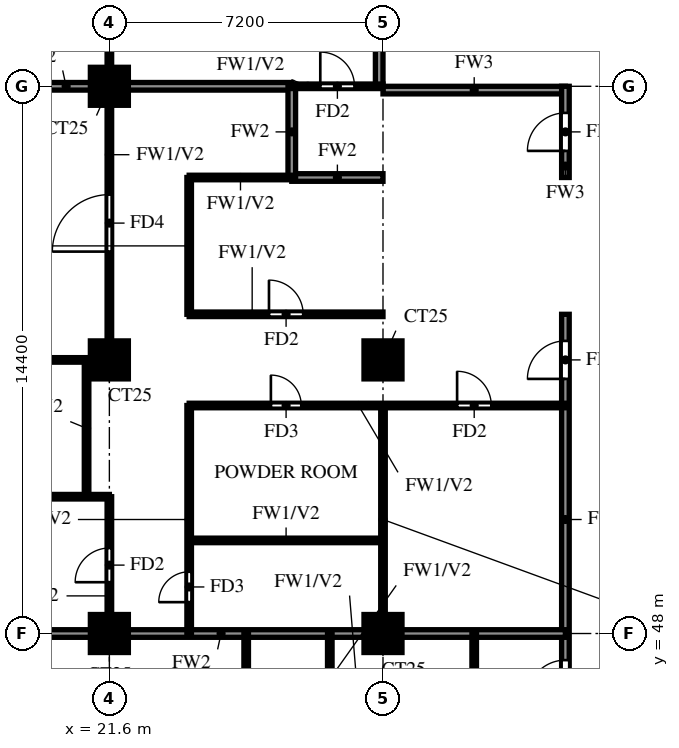
"""IFC4 building model, lengths in metres.
Left out: names, types, materials, properties, quantities, classifications, styles, units other than length and angle.
Written with IfcOpenShell. Run it as: python <this file> out.ifc"""

import sys

from ifc_helpers import new_model, si_unit, direction, frame, frame_2d, origin, origin_2d, place, context, subcontext, project, spatial, rectangle, extrude, source, transform, mapped, element, fill, save


model = new_model("IFC4")
c1 = context("Model", 3, precision=1e-05, world=origin(), true_north=direction((0.0, 1.0)))
c2 = subcontext(c1, "Body", "Model", "MODEL_VIEW")
j1 = project(units=[si_unit("LENGTHUNIT", "METRE"), si_unit("PLANEANGLEUNIT", "RADIAN")], contexts=[c1])
p1 = place(None, origin())
s1 = spatial("IfcSite", under=j1, at=p1, CompositionType="ELEMENT")
p2 = place(p1, origin())
s2 = spatial("IfcBuilding", under=s1, at=p2, CompositionType="ELEMENT")
p3 = place(p2, frame((0.0, 0.0, 167.5)))
s3 = spatial("IfcBuildingStorey", under=s2, at=p3, CompositionType="ELEMENT", Elevation=167.5)
m1 = source(origin(), c2, "Body", "SweptSolid", [
    extrude(rectangle(XDim=1.0, YDim=1.0, at=origin_2d()), origin(), (0.0, 0.0, 1.0), 3.2),
])
for number, where, z_axis, x_axis in (
    (1, (21.6, 48.0, 0.0), (0.0, 0.0, 1.0), (1.0, 0.0, 0.0)),
    (2, (28.8, 48.0, 0.0), (0.0, 0.0, 1.0), (1.0, 0.0, 0.0)),
    (3, (21.6, 55.2, 0.0), (0.0, 0.0, 1.0), (1.0, 0.0, 0.0)),
    (4, (28.8, 55.2, 0.0), (0.0, 0.0, 1.0), (1.0, 0.0, 0.0)),
    (5, (21.6, 62.4, 0.0), (0.0, 0.0, 1.0), (1.0, 0.0, 0.0)),
):
    element("IfcColumn", number, at=place(p3, frame(where, z_axis=z_axis, x_axis=x_axis)), inside=s3, PredefinedType="COLUMN", context=c2, shape_type="MappedRepresentation", body=[
        mapped(m1, transform((0.0, 0.0, 0.0))),
    ])
p4 = place(p3, frame((28.8, 62.3, 0.0), z_axis=(0.0, 0.0, 1.0), x_axis=(1.0, 0.0, 0.0)))
e6 = element("IfcWall", 6, at=p4, inside=s3, PredefinedType="SOLIDWALL", context=c2, shape_type="SweptSolid", body=[
    extrude(rectangle(XDim=4.8, YDim=0.2, at=frame_2d((2.4, 0.0))), origin(), (0.0, 0.0, 1.0), 3.2),
])
p5 = place(p3, frame((28.7, 62.4, 0.0), z_axis=(0.0, 0.0, 1.0), x_axis=(0.0, 1.0, 0.0)))
e7 = element("IfcWall", 7, at=p5, inside=s3, PredefinedType="SOLIDWALL", context=c2, shape_type="SweptSolid", body=[
    extrude(rectangle(XDim=15.6, YDim=0.2, at=frame_2d((7.8, 0.0))), origin(), (0.0, 0.0, 1.0), 3.2),
])
p6 = place(p3, frame((33.6, 45.6, 0.0), z_axis=(0.0, 0.0, 1.0), x_axis=(0.0, 1.0, 0.0)))
e8 = element("IfcWall", 8, at=p6, inside=s3, PredefinedType="SOLIDWALL", context=c2, shape_type="SweptSolid", body=[
    extrude(rectangle(XDim=10.8, YDim=0.2, at=frame_2d((5.4, 0.0))), origin(), (0.0, 0.0, 1.0), 3.2),
])
p7 = place(p6, frame((0.7, 0.0, 0.0)))
e9 = element("IfcOpeningElement", 9, at=p7, cuts=e8, PredefinedType="OPENING", context=c2, shape_type="SweptSolid", body=[
    extrude(rectangle(XDim=1.0, YDim=2.1, at=frame_2d((0.5, 1.05))), frame((0.0, 0.11, 0.0), z_axis=(0.0, -1.0, 0.0), x_axis=(1.0, 0.0, 0.0)), (0.0, 0.0, 1.0), 0.22),
])
p8 = place(p6, frame((9.1, 0.0, 0.0)))
e10 = element("IfcOpeningElement", 10, at=p8, cuts=e8, PredefinedType="OPENING", context=c2, shape_type="SweptSolid", body=[
    extrude(rectangle(XDim=1.0, YDim=2.1, at=frame_2d((0.5, 1.05))), frame((0.0, 0.11, 0.0), z_axis=(0.0, -1.0, 0.0), x_axis=(1.0, 0.0, 0.0)), (0.0, 0.0, 1.0), 0.22),
])
p9 = place(p3, frame((33.6, 60.0, 0.0), z_axis=(0.0, 0.0, 1.0), x_axis=(0.0, 1.0, 0.0)))
e11 = element("IfcWall", 11, at=p9, inside=s3, PredefinedType="SOLIDWALL", context=c2, shape_type="SweptSolid", body=[
    extrude(rectangle(XDim=2.4, YDim=0.2, at=frame_2d((1.2, 0.0))), origin(), (0.0, 0.0, 1.0), 3.2),
])
p10 = place(p9, frame((0.7, 0.0, 0.0)))
e12 = element("IfcOpeningElement", 12, at=p10, cuts=e11, PredefinedType="OPENING", context=c2, shape_type="SweptSolid", body=[
    extrude(rectangle(XDim=1.0, YDim=2.1, at=frame_2d((0.5, 1.05))), frame((0.0, 0.11, 0.0), z_axis=(0.0, -1.0, 0.0), x_axis=(1.0, 0.0, 0.0)), (0.0, 0.0, 1.0), 0.22),
])
p11 = place(p3, frame((14.525, 48.0, 0.0), z_axis=(0.0, 0.0, 1.0), x_axis=(1.0, 0.0, 0.0)))
e13 = element("IfcWall", 13, at=p11, inside=s3, PredefinedType="SOLIDWALL", context=c2, shape_type="SweptSolid", body=[
    extrude(rectangle(XDim=19.075, YDim=0.2, at=frame_2d((9.538, 0.0))), origin(), (0.0, 0.0, 1.0), 3.2),
])
p12 = place(p3, frame((26.4, 60.0, 0.0), z_axis=(0.0, 0.0, 1.0), x_axis=(1.0, 0.0, 0.0)))
e14 = element("IfcWall", 14, at=p12, inside=s3, PredefinedType="SOLIDWALL", context=c2, shape_type="SweptSolid", body=[
    extrude(rectangle(XDim=2.4, YDim=0.2, at=frame_2d((1.2, 0.0))), origin(), (0.0, 0.0, 1.0), 3.2),
])
p13 = place(p3, frame((14.525, 62.4, 0.0), z_axis=(0.0, 0.0, 1.0), x_axis=(1.0, 0.0, 0.0)))
e15 = element("IfcWall", 15, at=p13, inside=s3, PredefinedType="SOLIDWALL", context=c2, shape_type="SweptSolid", body=[
    extrude(rectangle(XDim=11.875, YDim=0.2, at=frame_2d((5.938, 0.0))), origin(), (0.0, 0.0, 1.0), 3.2),
])
p14 = place(p3, frame((26.4, 60.0, 0.0), z_axis=(0.0, 0.0, 1.0), x_axis=(0.0, 1.0, 0.0)))
e16 = element("IfcWall", 16, at=p14, inside=s3, PredefinedType="SOLIDWALL", context=c2, shape_type="SweptSolid", body=[
    extrude(rectangle(XDim=2.4, YDim=0.2, at=frame_2d((1.2, 0.0))), origin(), (0.0, 0.0, 1.0), 3.2),
])
p15 = place(p3, frame((23.7, 50.45, 0.0), z_axis=(0.0, 0.0, 1.0), x_axis=(1.0, 0.0, 0.0)))
e17 = element("IfcWall", 17, at=p15, inside=s3, PredefinedType="PARTITIONING", context=c2, shape_type="SweptSolid", body=[
    extrude(rectangle(XDim=5.1, YDim=0.12, at=frame_2d((2.55, 0.0))), origin(), (0.0, 0.0, 1.0), 3.2),
])
p16 = place(p3, frame((14.525, 51.6, 0.0), z_axis=(0.0, 0.0, 1.0), x_axis=(1.0, 0.0, 0.0)))
e18 = element("IfcWall", 18, at=p16, inside=s3, PredefinedType="PARTITIONING", context=c2, shape_type="SweptSolid", body=[
    extrude(rectangle(XDim=7.075, YDim=0.12, at=frame_2d((3.538, 0.0))), origin(), (0.0, 0.0, 1.0), 2.3),
])
p17 = place(p16, frame((2.837, 0.0, 0.0)))
e19 = element("IfcOpeningElement", 19, at=p17, cuts=e18, PredefinedType="OPENING", context=c2, shape_type="SweptSolid", body=[
    extrude(rectangle(XDim=0.8, YDim=2.1, at=frame_2d((0.4, 1.05))), frame((0.0, 0.07, 0.0), z_axis=(0.0, -1.0, 0.0), x_axis=(1.0, 0.0, 0.0)), (0.0, 0.0, 1.0), 0.14),
])
p18 = place(p3, frame((23.7, 54.0, 0.0), z_axis=(0.0, 0.0, 1.0), x_axis=(1.0, 0.0, 0.0)))
e20 = element("IfcWall", 20, at=p18, inside=s3, PredefinedType="PARTITIONING", context=c2, shape_type="SweptSolid", body=[
    extrude(rectangle(XDim=9.9, YDim=0.12, at=frame_2d((4.95, 0.0))), origin(), (0.0, 0.0, 1.0), 3.2),
])
p19 = place(p18, frame((2.15, 0.0, 0.0)))
e21 = element("IfcOpeningElement", 21, at=p19, cuts=e20, PredefinedType="OPENING", context=c2, shape_type="SweptSolid", body=[
    extrude(rectangle(XDim=0.8, YDim=2.1, at=frame_2d((0.4, 1.05))), frame((0.0, 0.07, 0.0), z_axis=(0.0, -1.0, 0.0), x_axis=(1.0, 0.0, 0.0)), (0.0, 0.0, 1.0), 0.14),
])
p20 = place(p18, frame((7.05, 0.0, 0.0)))
e22 = element("IfcOpeningElement", 22, at=p20, cuts=e20, PredefinedType="OPENING", context=c2, shape_type="SweptSolid", body=[
    extrude(rectangle(XDim=0.9, YDim=2.1, at=frame_2d((0.45, 1.05))), frame((0.0, 0.07, 0.0), z_axis=(0.0, -1.0, 0.0), x_axis=(1.0, 0.0, 0.0)), (0.0, 0.0, 1.0), 0.14),
])
p21 = place(p3, frame((14.525, 55.2, 0.0), z_axis=(0.0, 0.0, 1.0), x_axis=(1.0, 0.0, 0.0)))
e23 = element("IfcWall", 23, at=p21, inside=s3, PredefinedType="PARTITIONING", context=c2, shape_type="SweptSolid", body=[
    extrude(rectangle(XDim=7.075, YDim=0.12, at=frame_2d((3.538, 0.0))), origin(), (0.0, 0.0, 1.0), 3.2),
])
p22 = place(p3, frame((23.7, 56.4, 0.0), z_axis=(0.0, 0.0, 1.0), x_axis=(1.0, 0.0, 0.0)))
e24 = element("IfcWall", 24, at=p22, inside=s3, PredefinedType="PARTITIONING", context=c2, shape_type="SweptSolid", body=[
    extrude(rectangle(XDim=5.1, YDim=0.12, at=frame_2d((2.55, 0.0))), origin(), (0.0, 0.0, 1.0), 3.2),
])
p23 = place(p22, frame((2.1, 0.0, 0.0)))
e25 = element("IfcOpeningElement", 25, at=p23, cuts=e24, PredefinedType="OPENING", context=c2, shape_type="SweptSolid", body=[
    extrude(rectangle(XDim=0.9, YDim=2.1, at=frame_2d((0.45, 1.05))), frame((0.0, 0.07, 0.0), z_axis=(0.0, -1.0, 0.0), x_axis=(1.0, 0.0, 0.0)), (0.0, 0.0, 1.0), 0.14),
])
p24 = place(p3, frame((23.7, 60.0, 0.0), z_axis=(0.0, 0.0, 1.0), x_axis=(1.0, 0.0, 0.0)))
e26 = element("IfcWall", 26, at=p24, inside=s3, PredefinedType="PARTITIONING", context=c2, shape_type="SweptSolid", body=[
    extrude(rectangle(XDim=2.7, YDim=0.12, at=frame_2d((1.35, 0.0))), origin(), (0.0, 0.0, 1.0), 3.2),
])
p25 = place(p3, frame((26.4, 62.4, 0.0), z_axis=(0.0, 0.0, 1.0), x_axis=(1.0, 0.0, 0.0)))
e27 = element("IfcWall", 27, at=p25, inside=s3, PredefinedType="PARTITIONING", context=c2, shape_type="SweptSolid", body=[
    extrude(rectangle(XDim=2.4, YDim=0.12, at=frame_2d((1.2, 0.0))), origin(), (0.0, 0.0, 1.0), 3.2),
])
p26 = place(p25, frame((0.75, 0.0, 0.0)))
e28 = element("IfcOpeningElement", 28, at=p26, cuts=e27, PredefinedType="OPENING", context=c2, shape_type="SweptSolid", body=[
    extrude(rectangle(XDim=0.9, YDim=2.1, at=frame_2d((0.45, 1.05))), frame((0.0, 0.07, 0.0), z_axis=(0.0, -1.0, 0.0), x_axis=(1.0, 0.0, 0.0)), (0.0, 0.0, 1.0), 0.14),
])
p27 = place(p3, frame((21.0, 51.6, 0.0), z_axis=(0.0, 0.0, 1.0), x_axis=(0.0, 1.0, 0.0)))
e29 = element("IfcWall", 29, at=p27, inside=s3, PredefinedType="PARTITIONING", context=c2, shape_type="SweptSolid", body=[
    extrude(rectangle(XDim=3.6, YDim=0.12, at=frame_2d((1.8, 0.0))), origin(), (0.0, 0.0, 1.0), 3.2),
])
p28 = place(p3, frame((21.6, 48.0, 0.0), z_axis=(0.0, 0.0, 1.0), x_axis=(0.0, 1.0, 0.0)))
e30 = element("IfcWall", 30, at=p28, inside=s3, PredefinedType="PARTITIONING", context=c2, shape_type="SweptSolid", body=[
    extrude(rectangle(XDim=3.6, YDim=0.12, at=frame_2d((1.8, 0.0))), origin(), (0.0, 0.0, 1.0), 3.2),
])
p29 = place(p28, frame((1.35, 0.0, 0.0)))
e31 = element("IfcOpeningElement", 31, at=p29, cuts=e30, PredefinedType="OPENING", context=c2, shape_type="SweptSolid", body=[
    extrude(rectangle(XDim=0.9, YDim=2.1, at=frame_2d((0.45, 1.05))), frame((0.0, 0.07, 0.0), z_axis=(0.0, -1.0, 0.0), x_axis=(1.0, 0.0, 0.0)), (0.0, 0.0, 1.0), 0.14),
])
p30 = place(p3, frame((21.6, 55.2, 0.0), z_axis=(0.0, 0.0, 1.0), x_axis=(0.0, 1.0, 0.0)))
e32 = element("IfcWall", 32, at=p30, inside=s3, PredefinedType="PARTITIONING", context=c2, shape_type="SweptSolid", body=[
    extrude(rectangle(XDim=10.8, YDim=0.12, at=frame_2d((5.4, 0.0))), origin(), (0.0, 0.0, 1.0), 3.2),
])
p31 = place(p30, frame((2.85, 0.0, 0.0)))
e33 = element("IfcOpeningElement", 33, at=p31, cuts=e32, PredefinedType="OPENING", context=c2, shape_type="SweptSolid", body=[
    extrude(rectangle(XDim=1.5, YDim=2.1, at=frame_2d((0.75, 1.05))), frame((0.0, 0.07, 0.0), z_axis=(0.0, -1.0, 0.0), x_axis=(1.0, 0.0, 0.0)), (0.0, 0.0, 1.0), 0.14),
])
p32 = place(p30, frame((8.55, 0.0, 0.0)))
e34 = element("IfcOpeningElement", 34, at=p32, cuts=e32, PredefinedType="OPENING", context=c2, shape_type="SweptSolid", body=[
    extrude(rectangle(XDim=0.9, YDim=2.1, at=frame_2d((0.45, 1.05))), frame((0.0, 0.07, 0.0), z_axis=(0.0, -1.0, 0.0), x_axis=(1.0, 0.0, 0.0)), (0.0, 0.0, 1.0), 0.14),
])
p33 = place(p3, frame((23.7, 48.0, 0.0), z_axis=(0.0, 0.0, 1.0), x_axis=(0.0, 1.0, 0.0)))
e35 = element("IfcWall", 35, at=p33, inside=s3, PredefinedType="PARTITIONING", context=c2, shape_type="SweptSolid", body=[
    extrude(rectangle(XDim=6.0, YDim=0.12, at=frame_2d((3.0, 0.0))), origin(), (0.0, 0.0, 1.0), 3.2),
])
p34 = place(p33, frame((0.825, 0.0, 0.0)))
e36 = element("IfcOpeningElement", 36, at=p34, cuts=e35, PredefinedType="OPENING", context=c2, shape_type="SweptSolid", body=[
    extrude(rectangle(XDim=0.8, YDim=2.1, at=frame_2d((0.4, 1.05))), frame((0.0, 0.07, 0.0), z_axis=(0.0, -1.0, 0.0), x_axis=(1.0, 0.0, 0.0)), (0.0, 0.0, 1.0), 0.14),
])
p35 = place(p3, frame((23.7, 56.4, 0.0), z_axis=(0.0, 0.0, 1.0), x_axis=(0.0, 1.0, 0.0)))
e37 = element("IfcWall", 37, at=p35, inside=s3, PredefinedType="PARTITIONING", context=c2, shape_type="SweptSolid", body=[
    extrude(rectangle(XDim=3.6, YDim=0.12, at=frame_2d((1.8, 0.0))), origin(), (0.0, 0.0, 1.0), 3.2),
])
p36 = place(p3, frame((25.2, 39.725, 0.0), z_axis=(0.0, 0.0, 1.0), x_axis=(0.0, 1.0, 0.0)))
e38 = element("IfcWall", 38, at=p36, inside=s3, PredefinedType="PARTITIONING", context=c2, shape_type="SweptSolid", body=[
    extrude(rectangle(XDim=8.275, YDim=0.12, at=frame_2d((4.137, 0.0))), origin(), (0.0, 0.0, 1.0), 3.2),
])
p37 = place(p36, frame((4.525, 0.0, 0.0)))
e39 = element("IfcOpeningElement", 39, at=p37, cuts=e38, PredefinedType="OPENING", context=c2, shape_type="SweptSolid", body=[
    extrude(rectangle(XDim=0.9, YDim=2.1, at=frame_2d((0.45, 1.05))), frame((0.0, 0.07, 0.0), z_axis=(0.0, -1.0, 0.0), x_axis=(1.0, 0.0, 0.0)), (0.0, 0.0, 1.0), 0.14),
])
p38 = place(p3, frame((27.4, 45.6, 0.0), z_axis=(0.0, 0.0, 1.0), x_axis=(0.0, 1.0, 0.0)))
e40 = element("IfcWall", 40, at=p38, inside=s3, PredefinedType="PARTITIONING", context=c2, shape_type="SweptSolid", body=[
    extrude(rectangle(XDim=2.4, YDim=0.12, at=frame_2d((1.2, 0.0))), origin(), (0.0, 0.0, 1.0), 3.2),
])
p39 = place(p3, frame((28.8, 48.0, 0.0), z_axis=(0.0, 0.0, 1.0), x_axis=(0.0, 1.0, 0.0)))
e41 = element("IfcWall", 41, at=p39, inside=s3, PredefinedType="PARTITIONING", context=c2, shape_type="SweptSolid", body=[
    extrude(rectangle(XDim=6.0, YDim=0.12, at=frame_2d((3.0, 0.0))), origin(), (0.0, 0.0, 1.0), 3.2),
])
p40 = place(p3, frame((31.2, 45.6, 0.0), z_axis=(0.0, 0.0, 1.0), x_axis=(0.0, 1.0, 0.0)))
e42 = element("IfcWall", 42, at=p40, inside=s3, PredefinedType="PARTITIONING", context=c2, shape_type="SweptSolid", body=[
    extrude(rectangle(XDim=2.4, YDim=0.12, at=frame_2d((1.2, 0.0))), origin(), (0.0, 0.0, 1.0), 3.2),
])
p41 = place(p7, origin())
e43 = element("IfcDoor", 43, at=p41, inside=s3, OperationType="SINGLE_SWING_LEFT", PredefinedType="DOOR", context=c2, shape_type="SweptSolid", body=[
    extrude(rectangle(XDim=1.0, YDim=2.1, at=frame_2d((0.5, 1.05))), frame((0.0, 0.025, 0.0), z_axis=(0.0, -1.0, 0.0), x_axis=(1.0, 0.0, 0.0)), (0.0, 0.0, 1.0), 0.05),
])
fill(e9, e43)
p42 = place(p8, origin())
e44 = element("IfcDoor", 44, at=p42, inside=s3, OperationType="SINGLE_SWING_RIGHT", PredefinedType="DOOR", context=c2, shape_type="SweptSolid", body=[
    extrude(rectangle(XDim=1.0, YDim=2.1, at=frame_2d((0.5, 1.05))), frame((0.0, 0.025, 0.0), z_axis=(0.0, -1.0, 0.0), x_axis=(1.0, 0.0, 0.0)), (0.0, 0.0, 1.0), 0.05),
])
fill(e10, e44)
p43 = place(p29, origin())
e45 = element("IfcDoor", 45, at=p43, inside=s3, OperationType="SINGLE_SWING_LEFT", PredefinedType="DOOR", context=c2, shape_type="SweptSolid", body=[
    extrude(rectangle(XDim=0.9, YDim=2.1, at=frame_2d((0.45, 1.05))), frame((0.0, 0.025, 0.0), z_axis=(0.0, -1.0, 0.0), x_axis=(1.0, 0.0, 0.0)), (0.0, 0.0, 1.0), 0.05),
])
fill(e31, e45)
p44 = place(p31, origin())
e46 = element("IfcDoor", 46, at=p44, inside=s3, OperationType="SINGLE_SWING_RIGHT", PredefinedType="DOOR", context=c2, shape_type="SweptSolid", body=[
    extrude(rectangle(XDim=1.5, YDim=2.1, at=frame_2d((0.75, 1.05))), frame((0.0, 0.025, 0.0), z_axis=(0.0, -1.0, 0.0), x_axis=(1.0, 0.0, 0.0)), (0.0, 0.0, 1.0), 0.05),
])
fill(e33, e46)
p45 = place(p34, origin())
e47 = element("IfcDoor", 47, at=p45, inside=s3, OperationType="SINGLE_SWING_LEFT", PredefinedType="DOOR", context=c2, shape_type="SweptSolid", body=[
    extrude(rectangle(XDim=0.8, YDim=2.1, at=frame_2d((0.4, 1.05))), frame((0.0, 0.025, 0.0), z_axis=(0.0, -1.0, 0.0), x_axis=(1.0, 0.0, 0.0)), (0.0, 0.0, 1.0), 0.05),
])
fill(e36, e47)
p46 = place(p19, origin())
e48 = element("IfcDoor", 48, at=p46, inside=s3, OperationType="SINGLE_SWING_LEFT", PredefinedType="DOOR", context=c2, shape_type="SweptSolid", body=[
    extrude(rectangle(XDim=0.8, YDim=2.1, at=frame_2d((0.4, 1.05))), frame((0.0, 0.025, 0.0), z_axis=(0.0, -1.0, 0.0), x_axis=(1.0, 0.0, 0.0)), (0.0, 0.0, 1.0), 0.05),
])
fill(e21, e48)
p47 = place(p23, origin())
e49 = element("IfcDoor", 49, at=p47, inside=s3, OperationType="SINGLE_SWING_RIGHT", PredefinedType="DOOR", context=c2, shape_type="SweptSolid", body=[
    extrude(rectangle(XDim=0.9, YDim=2.1, at=frame_2d((0.45, 1.05))), frame((0.0, 0.025, 0.0), z_axis=(0.0, -1.0, 0.0), x_axis=(1.0, 0.0, 0.0)), (0.0, 0.0, 1.0), 0.05),
])
fill(e25, e49)
p48 = place(p20, origin())
e50 = element("IfcDoor", 50, at=p48, inside=s3, OperationType="SINGLE_SWING_LEFT", PredefinedType="DOOR", context=c2, shape_type="SweptSolid", body=[
    extrude(rectangle(XDim=0.9, YDim=2.1, at=frame_2d((0.45, 1.05))), frame((0.0, 0.025, 0.0), z_axis=(0.0, -1.0, 0.0), x_axis=(1.0, 0.0, 0.0)), (0.0, 0.0, 1.0), 0.05),
])
fill(e22, e50)
p49 = place(p26, origin())
e51 = element("IfcDoor", 51, at=p49, inside=s3, OperationType="SINGLE_SWING_LEFT", PredefinedType="DOOR", context=c2, shape_type="SweptSolid", body=[
    extrude(rectangle(XDim=0.9, YDim=2.1, at=frame_2d((0.45, 1.05))), frame((0.0, 0.025, 0.0), z_axis=(0.0, -1.0, 0.0), x_axis=(1.0, 0.0, 0.0)), (0.0, 0.0, 1.0), 0.05),
])
fill(e28, e51)
p50 = place(p10, origin())
e52 = element("IfcDoor", 52, at=p50, inside=s3, OperationType="SINGLE_SWING_RIGHT", PredefinedType="DOOR", context=c2, shape_type="SweptSolid", body=[
    extrude(rectangle(XDim=1.0, YDim=2.1, at=frame_2d((0.5, 1.05))), frame((0.0, 0.025, 0.0), z_axis=(0.0, -1.0, 0.0), x_axis=(1.0, 0.0, 0.0)), (0.0, 0.0, 1.0), 0.05),
])
fill(e12, e52)
save(model, sys.argv[1])
